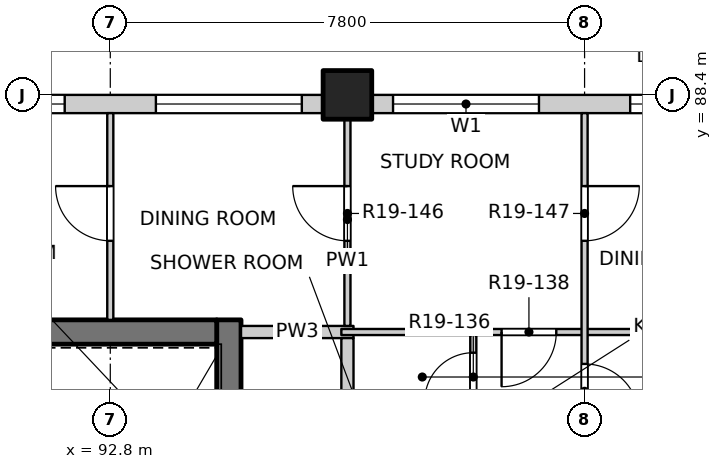
"""IFC4 building model, lengths in metres.
Left out: names, types, materials, properties, quantities, classifications, styles, units other than length and angle.
Written with IfcOpenShell. Run it as: python <this file> out.ifc"""

import sys

from ifc_helpers import new_model, si_unit, direction, frame, frame_2d, origin, origin_2d, place, context, subcontext, project, spatial, rectangle, extrude, element, fill, save


model = new_model("IFC4")
c1 = context("Model", 3, precision=1e-05, world=origin(), true_north=direction((0.0, 1.0)))
c2 = subcontext(c1, "Body", "Model", "MODEL_VIEW")
j1 = project(units=[si_unit("LENGTHUNIT", "METRE"), si_unit("PLANEANGLEUNIT", "RADIAN")], contexts=[c1])
p1 = place(None, origin())
s1 = spatial("IfcSite", under=j1, at=p1, CompositionType="ELEMENT")
p2 = place(p1, origin())
s2 = spatial("IfcBuilding", under=s1, at=p2, CompositionType="ELEMENT")
p3 = place(p2, frame((0.0, 0.0, 197.3)))
s3 = spatial("IfcBuildingStorey", under=s2, at=p3, CompositionType="ELEMENT", Elevation=197.3)
p4 = place(p3, frame((96.7, 88.4, -0.3), z_axis=(0.0, 0.0, 1.0), x_axis=(1.0, 0.0, 0.0)))
e1 = element("IfcColumn", 1, at=p4, inside=s3, PredefinedType="COLUMN", context=c2, shape_type="SweptSolid", body=[
    extrude(rectangle(XDim=0.8, YDim=0.8, at=origin_2d()), origin(), (0.0, 0.0, 1.0), 3.45),
])
p5 = place(p3, frame((94.75, 77.3, -0.3), z_axis=(0.0, 0.0, 1.0), x_axis=(0.0, 1.0, 0.0)))
e2 = element("IfcWall", 2, at=p5, inside=s3, PredefinedType="SOLIDWALL", context=c2, shape_type="SweptSolid", body=[
    extrude(rectangle(XDim=7.4, YDim=0.4, at=frame_2d((3.7, 0.0))), origin(), (0.0, 0.0, 1.0), 3.45),
])
p6 = place(p5, frame((0.3, 0.0, 0.3)))
e3 = element("IfcOpeningElement", 3, at=p6, cuts=e2, PredefinedType="OPENING", context=c2, shape_type="SweptSolid", body=[
    extrude(rectangle(XDim=1.2, YDim=2.1, at=frame_2d((0.6, 1.05))), frame((0.0, 0.21, 0.0), z_axis=(0.0, -1.0, 0.0), x_axis=(1.0, 0.0, 0.0)), (0.0, 0.0, 1.0), 0.42),
])
p7 = place(p3, frame((75.45, 84.5, -0.3), z_axis=(0.0, 0.0, 1.0), x_axis=(1.0, 0.0, 0.0)))
e4 = element("IfcWall", 4, at=p7, inside=s3, PredefinedType="SOLIDWALL", context=c2, shape_type="SweptSolid", body=[
    extrude(rectangle(XDim=19.1, YDim=0.4, at=frame_2d((9.55, 0.0))), origin(), (0.0, 0.0, 1.0), 3.45),
])
p8 = place(p3, frame((73.7, 88.25, 0.0), z_axis=(0.0, 0.0, 1.0), x_axis=(1.0, 0.0, 0.0)))
e5 = element("IfcWall", 5, at=p8, inside=s3, PredefinedType="SOLIDWALL", context=c2, shape_type="SweptSolid", body=[
    extrude(rectangle(XDim=22.6, YDim=0.3, at=frame_2d((11.3, 0.0))), origin(), (0.0, 0.0, 1.0), 2.7),
])
p9 = place(p8, frame((0.35, 0.0, 0.9)))
e6 = element("IfcOpeningElement", 6, at=p9, cuts=e5, PredefinedType="OPENING", context=c2, shape_type="SweptSolid", body=[
    extrude(rectangle(XDim=2.4, YDim=1.8, at=frame_2d((1.2, 0.9))), frame((0.0, 0.16, 0.0), z_axis=(0.0, -1.0, 0.0), x_axis=(1.0, 0.0, 0.0)), (0.0, 0.0, 1.0), 0.32),
])
p10 = place(p8, frame((4.25, 0.0, 0.9)))
e7 = element("IfcOpeningElement", 7, at=p10, cuts=e5, PredefinedType="OPENING", context=c2, shape_type="SweptSolid", body=[
    extrude(rectangle(XDim=2.4, YDim=1.8, at=frame_2d((1.2, 0.9))), frame((0.0, 0.16, 0.0), z_axis=(0.0, -1.0, 0.0), x_axis=(1.0, 0.0, 0.0)), (0.0, 0.0, 1.0), 0.32),
])
p11 = place(p8, frame((8.15, 0.0, 0.9)))
e8 = element("IfcOpeningElement", 8, at=p11, cuts=e5, PredefinedType="OPENING", context=c2, shape_type="SweptSolid", body=[
    extrude(rectangle(XDim=2.4, YDim=1.8, at=frame_2d((1.2, 0.9))), frame((0.0, 0.16, 0.0), z_axis=(0.0, -1.0, 0.0), x_axis=(1.0, 0.0, 0.0)), (0.0, 0.0, 1.0), 0.32),
])
p12 = place(p8, frame((12.05, 0.0, 0.9)))
e9 = element("IfcOpeningElement", 9, at=p12, cuts=e5, PredefinedType="OPENING", context=c2, shape_type="SweptSolid", body=[
    extrude(rectangle(XDim=2.4, YDim=1.8, at=frame_2d((1.2, 0.9))), frame((0.0, 0.16, 0.0), z_axis=(0.0, -1.0, 0.0), x_axis=(1.0, 0.0, 0.0)), (0.0, 0.0, 1.0), 0.32),
])
p13 = place(p8, frame((15.95, 0.0, 0.9)))
e10 = element("IfcOpeningElement", 10, at=p13, cuts=e5, PredefinedType="OPENING", context=c2, shape_type="SweptSolid", body=[
    extrude(rectangle(XDim=2.4, YDim=1.8, at=frame_2d((1.2, 0.9))), frame((0.0, 0.16, 0.0), z_axis=(0.0, -1.0, 0.0), x_axis=(1.0, 0.0, 0.0)), (0.0, 0.0, 1.0), 0.32),
])
p14 = place(p8, frame((19.85, 0.0, 0.9)))
e11 = element("IfcOpeningElement", 11, at=p14, cuts=e5, PredefinedType="OPENING", context=c2, shape_type="SweptSolid", body=[
    extrude(rectangle(XDim=2.4, YDim=1.8, at=frame_2d((1.2, 0.9))), frame((0.0, 0.16, 0.0), z_axis=(0.0, -1.0, 0.0), x_axis=(1.0, 0.0, 0.0)), (0.0, 0.0, 1.0), 0.32),
])
p15 = place(p3, frame((97.1, 88.25, 0.0), z_axis=(0.0, 0.0, 1.0), x_axis=(1.0, 0.0, 0.0)))
e12 = element("IfcWall", 12, at=p15, inside=s3, PredefinedType="SOLIDWALL", context=c2, shape_type="SweptSolid", body=[
    extrude(rectangle(XDim=7.4, YDim=0.3, at=frame_2d((3.7, 0.0))), origin(), (0.0, 0.0, 1.0), 2.7),
])
p16 = place(p15, frame((0.35, 0.0, 0.9)))
e13 = element("IfcOpeningElement", 13, at=p16, cuts=e12, PredefinedType="OPENING", context=c2, shape_type="SweptSolid", body=[
    extrude(rectangle(XDim=2.4, YDim=1.8, at=frame_2d((1.2, 0.9))), frame((0.0, 0.16, 0.0), z_axis=(0.0, -1.0, 0.0), x_axis=(1.0, 0.0, 0.0)), (0.0, 0.0, 1.0), 0.32),
])
p17 = place(p15, frame((4.25, 0.0, 0.9)))
e14 = element("IfcOpeningElement", 14, at=p17, cuts=e12, PredefinedType="OPENING", context=c2, shape_type="SweptSolid", body=[
    extrude(rectangle(XDim=2.4, YDim=1.8, at=frame_2d((1.2, 0.9))), frame((0.0, 0.16, 0.0), z_axis=(0.0, -1.0, 0.0), x_axis=(1.0, 0.0, 0.0)), (0.0, 0.0, 1.0), 0.32),
])
p18 = place(p3, frame((94.95, 84.5, 0.0), z_axis=(0.0, 0.0, 1.0), x_axis=(1.0, 0.0, 0.0)))
e15 = element("IfcWall", 15, at=p18, inside=s3, PredefinedType="PARTITIONING", context=c2, shape_type="SweptSolid", body=[
    extrude(rectangle(XDim=1.85, YDim=0.2, at=frame_2d((0.925, 0.0))), origin(), (0.0, 0.0, 1.0), 3.15),
])
p19 = place(p3, frame((96.6, 84.5, 0.0), z_axis=(0.0, 0.0, 1.0), x_axis=(1.0, 0.0, 0.0)))
e16 = element("IfcWall", 16, at=p19, inside=s3, PredefinedType="PARTITIONING", context=c2, shape_type="SweptSolid", body=[
    extrude(rectangle(XDim=11.5, YDim=0.1, at=frame_2d((5.75, 0.0))), origin(), (0.0, 0.0, 1.0), 3.15),
])
p20 = place(p19, frame((2.635, 0.0, 0.0)))
e17 = element("IfcOpeningElement", 17, at=p20, cuts=e16, PredefinedType="OPENING", context=c2, shape_type="SweptSolid", body=[
    extrude(rectangle(XDim=0.9, YDim=2.1, at=frame_2d((0.45, 1.05))), frame((0.0, 0.06, 0.0), z_axis=(0.0, -1.0, 0.0), x_axis=(1.0, 0.0, 0.0)), (0.0, 0.0, 1.0), 0.12),
])
p21 = place(p3, frame((92.8, 84.7, 0.0), z_axis=(0.0, 0.0, 1.0), x_axis=(0.0, 1.0, 0.0)))
e18 = element("IfcWall", 18, at=p21, inside=s3, PredefinedType="PARTITIONING", context=c2, shape_type="SweptSolid", body=[
    extrude(rectangle(XDim=3.4, YDim=0.1, at=frame_2d((1.7, 0.0))), origin(), (0.0, 0.0, 1.0), 3.15),
])
p22 = place(p21, frame((1.3, 0.0, 0.0)))
e19 = element("IfcOpeningElement", 19, at=p22, cuts=e18, PredefinedType="OPENING", context=c2, shape_type="SweptSolid", body=[
    extrude(rectangle(XDim=0.9, YDim=2.1, at=frame_2d((0.45, 1.05))), frame((0.0, 0.06, 0.0), z_axis=(0.0, -1.0, 0.0), x_axis=(1.0, 0.0, 0.0)), (0.0, 0.0, 1.0), 0.12),
])
p23 = place(p3, frame((96.7, 49.5, 0.0), z_axis=(0.0, 0.0, 1.0), x_axis=(0.0, 1.0, 0.0)))
e20 = element("IfcWall", 20, at=p23, inside=s3, PredefinedType="PARTITIONING", context=c2, shape_type="SweptSolid", body=[
    extrude(rectangle(XDim=34.9, YDim=0.2, at=frame_2d((17.45, 0.0))), origin(), (0.0, 0.0, 1.0), 3.15),
])
p24 = place(p23, frame((6.525, 0.0, 0.0)))
e21 = element("IfcOpeningElement", 21, at=p24, cuts=e20, PredefinedType="OPENING", context=c2, shape_type="SweptSolid", body=[
    extrude(rectangle(XDim=1.0, YDim=2.1, at=frame_2d((0.5, 1.05))), frame((0.0, 0.11, 0.0), z_axis=(0.0, -1.0, 0.0), x_axis=(1.0, 0.0, 0.0)), (0.0, 0.0, 1.0), 0.22),
])
p25 = place(p23, frame((14.275, 0.0, 0.0)))
e22 = element("IfcOpeningElement", 22, at=p25, cuts=e20, PredefinedType="OPENING", context=c2, shape_type="SweptSolid", body=[
    extrude(rectangle(XDim=1.0, YDim=2.1, at=frame_2d((0.5, 1.05))), frame((0.0, 0.11, 0.0), z_axis=(0.0, -1.0, 0.0), x_axis=(1.0, 0.0, 0.0)), (0.0, 0.0, 1.0), 0.22),
])
p26 = place(p23, frame((25.075, 0.0, 0.0)))
e23 = element("IfcOpeningElement", 23, at=p26, cuts=e20, PredefinedType="OPENING", context=c2, shape_type="SweptSolid", body=[
    extrude(rectangle(XDim=1.0, YDim=2.1, at=frame_2d((0.5, 1.05))), frame((0.0, 0.11, 0.0), z_axis=(0.0, -1.0, 0.0), x_axis=(1.0, 0.0, 0.0)), (0.0, 0.0, 1.0), 0.22),
])
p27 = place(p23, frame((30.475, 0.0, 0.0)))
e24 = element("IfcOpeningElement", 24, at=p27, cuts=e20, PredefinedType="OPENING", context=c2, shape_type="SweptSolid", body=[
    extrude(rectangle(XDim=1.0, YDim=2.1, at=frame_2d((0.5, 1.05))), frame((0.0, 0.11, 0.0), z_axis=(0.0, -1.0, 0.0), x_axis=(1.0, 0.0, 0.0)), (0.0, 0.0, 1.0), 0.22),
])
p28 = place(p3, frame((96.7, 84.6, 0.0), z_axis=(0.0, 0.0, 1.0), x_axis=(0.0, 1.0, 0.0)))
e25 = element("IfcWall", 25, at=p28, inside=s3, PredefinedType="PARTITIONING", context=c2, shape_type="SweptSolid", body=[
    extrude(rectangle(XDim=3.5, YDim=0.1, at=frame_2d((1.75, 0.0))), origin(), (0.0, 0.0, 1.0), 3.15),
])
p29 = place(p28, frame((1.4, 0.0, 0.0)))
e26 = element("IfcOpeningElement", 26, at=p29, cuts=e25, PredefinedType="OPENING", context=c2, shape_type="SweptSolid", body=[
    extrude(rectangle(XDim=0.9, YDim=2.1, at=frame_2d((0.45, 1.05))), frame((0.0, 0.06, 0.0), z_axis=(0.0, -1.0, 0.0), x_axis=(1.0, 0.0, 0.0)), (0.0, 0.0, 1.0), 0.12),
])
p30 = place(p3, frame((98.77, 79.85, 0.0), z_axis=(0.0, 0.0, 1.0), x_axis=(0.0, 1.0, 0.0)))
e27 = element("IfcWall", 27, at=p30, inside=s3, PredefinedType="PARTITIONING", context=c2, shape_type="SweptSolid", body=[
    extrude(rectangle(XDim=4.6, YDim=0.1, at=frame_2d((2.3, 0.0))), origin(), (0.0, 0.0, 1.0), 3.15),
])
p31 = place(p30, frame((0.175, 0.0, 0.0)))
e28 = element("IfcOpeningElement", 28, at=p31, cuts=e27, PredefinedType="OPENING", context=c2, shape_type="SweptSolid", body=[
    extrude(rectangle(XDim=0.9, YDim=2.1, at=frame_2d((0.45, 1.05))), frame((0.0, 0.06, 0.0), z_axis=(0.0, -1.0, 0.0), x_axis=(1.0, 0.0, 0.0)), (0.0, 0.0, 1.0), 0.12),
])
p32 = place(p30, frame((1.785, 0.0, 0.0)))
e29 = element("IfcOpeningElement", 29, at=p32, cuts=e27, PredefinedType="OPENING", context=c2, shape_type="SweptSolid", body=[
    extrude(rectangle(XDim=0.9, YDim=2.1, at=frame_2d((0.45, 1.05))), frame((0.0, 0.06, 0.0), z_axis=(0.0, -1.0, 0.0), x_axis=(1.0, 0.0, 0.0)), (0.0, 0.0, 1.0), 0.12),
])
p33 = place(p30, frame((3.51, 0.0, 0.0)))
e30 = element("IfcOpeningElement", 30, at=p33, cuts=e27, PredefinedType="OPENING", context=c2, shape_type="SweptSolid", body=[
    extrude(rectangle(XDim=0.8, YDim=2.1, at=frame_2d((0.4, 1.05))), frame((0.0, 0.06, 0.0), z_axis=(0.0, -1.0, 0.0), x_axis=(1.0, 0.0, 0.0)), (0.0, 0.0, 1.0), 0.12),
])
p34 = place(p3, frame((100.6, 41.9, 0.0), z_axis=(0.0, 0.0, 1.0), x_axis=(0.0, 1.0, 0.0)))
e31 = element("IfcWall", 31, at=p34, inside=s3, PredefinedType="PARTITIONING", context=c2, shape_type="SweptSolid", body=[
    extrude(rectangle(XDim=46.2, YDim=0.1, at=frame_2d((23.1, 0.0))), origin(), (0.0, 0.0, 1.0), 3.15),
])
p35 = place(p34, frame((1.2, 0.0, 0.0)))
e32 = element("IfcOpeningElement", 32, at=p35, cuts=e31, PredefinedType="OPENING", context=c2, shape_type="SweptSolid", body=[
    extrude(rectangle(XDim=0.9, YDim=2.1, at=frame_2d((0.45, 1.05))), frame((0.0, 0.06, 0.0), z_axis=(0.0, -1.0, 0.0), x_axis=(1.0, 0.0, 0.0)), (0.0, 0.0, 1.0), 0.12),
])
p36 = place(p34, frame((5.1, 0.0, 0.0)))
e33 = element("IfcOpeningElement", 33, at=p36, cuts=e31, PredefinedType="OPENING", context=c2, shape_type="SweptSolid", body=[
    extrude(rectangle(XDim=0.9, YDim=2.1, at=frame_2d((0.45, 1.05))), frame((0.0, 0.06, 0.0), z_axis=(0.0, -1.0, 0.0), x_axis=(1.0, 0.0, 0.0)), (0.0, 0.0, 1.0), 0.12),
])
p37 = place(p34, frame((9.975, 0.0, 0.0)))
e34 = element("IfcOpeningElement", 34, at=p37, cuts=e31, PredefinedType="OPENING", context=c2, shape_type="SweptSolid", body=[
    extrude(rectangle(XDim=0.9, YDim=2.1, at=frame_2d((0.45, 1.05))), frame((0.0, 0.06, 0.0), z_axis=(0.0, -1.0, 0.0), x_axis=(1.0, 0.0, 0.0)), (0.0, 0.0, 1.0), 0.12),
])
p38 = place(p34, frame((12.9, 0.0, 0.0)))
e35 = element("IfcOpeningElement", 35, at=p38, cuts=e31, PredefinedType="OPENING", context=c2, shape_type="SweptSolid", body=[
    extrude(rectangle(XDim=0.9, YDim=2.1, at=frame_2d((0.45, 1.05))), frame((0.0, 0.06, 0.0), z_axis=(0.0, -1.0, 0.0), x_axis=(1.0, 0.0, 0.0)), (0.0, 0.0, 1.0), 0.12),
])
p39 = place(p34, frame((17.775, 0.0, 0.0)))
e36 = element("IfcOpeningElement", 36, at=p39, cuts=e31, PredefinedType="OPENING", context=c2, shape_type="SweptSolid", body=[
    extrude(rectangle(XDim=0.9, YDim=2.1, at=frame_2d((0.45, 1.05))), frame((0.0, 0.06, 0.0), z_axis=(0.0, -1.0, 0.0), x_axis=(1.0, 0.0, 0.0)), (0.0, 0.0, 1.0), 0.12),
])
p40 = place(p34, frame((20.7, 0.0, 0.0)))
e37 = element("IfcOpeningElement", 37, at=p40, cuts=e31, PredefinedType="OPENING", context=c2, shape_type="SweptSolid", body=[
    extrude(rectangle(XDim=0.9, YDim=2.1, at=frame_2d((0.45, 1.05))), frame((0.0, 0.06, 0.0), z_axis=(0.0, -1.0, 0.0), x_axis=(1.0, 0.0, 0.0)), (0.0, 0.0, 1.0), 0.12),
])
p41 = place(p34, frame((25.575, 0.0, 0.0)))
e38 = element("IfcOpeningElement", 38, at=p41, cuts=e31, PredefinedType="OPENING", context=c2, shape_type="SweptSolid", body=[
    extrude(rectangle(XDim=0.9, YDim=2.1, at=frame_2d((0.45, 1.05))), frame((0.0, 0.06, 0.0), z_axis=(0.0, -1.0, 0.0), x_axis=(1.0, 0.0, 0.0)), (0.0, 0.0, 1.0), 0.12),
])
p42 = place(p34, frame((28.5, 0.0, 0.0)))
e39 = element("IfcOpeningElement", 39, at=p42, cuts=e31, PredefinedType="OPENING", context=c2, shape_type="SweptSolid", body=[
    extrude(rectangle(XDim=0.9, YDim=2.1, at=frame_2d((0.45, 1.05))), frame((0.0, 0.06, 0.0), z_axis=(0.0, -1.0, 0.0), x_axis=(1.0, 0.0, 0.0)), (0.0, 0.0, 1.0), 0.12),
])
p43 = place(p34, frame((33.375, 0.0, 0.0)))
e40 = element("IfcOpeningElement", 40, at=p43, cuts=e31, PredefinedType="OPENING", context=c2, shape_type="SweptSolid", body=[
    extrude(rectangle(XDim=0.9, YDim=2.1, at=frame_2d((0.45, 1.05))), frame((0.0, 0.06, 0.0), z_axis=(0.0, -1.0, 0.0), x_axis=(1.0, 0.0, 0.0)), (0.0, 0.0, 1.0), 0.12),
])
p44 = place(p34, frame((37.225, 0.0, 0.0)))
e41 = element("IfcOpeningElement", 41, at=p44, cuts=e31, PredefinedType="OPENING", context=c2, shape_type="SweptSolid", body=[
    extrude(rectangle(XDim=0.9, YDim=2.1, at=frame_2d((0.45, 1.05))), frame((0.0, 0.06, 0.0), z_axis=(0.0, -1.0, 0.0), x_axis=(1.0, 0.0, 0.0)), (0.0, 0.0, 1.0), 0.12),
])
p45 = place(p34, frame((41.175, 0.0, 0.0)))
e42 = element("IfcOpeningElement", 42, at=p45, cuts=e31, PredefinedType="OPENING", context=c2, shape_type="SweptSolid", body=[
    extrude(rectangle(XDim=0.9, YDim=2.1, at=frame_2d((0.45, 1.05))), frame((0.0, 0.06, 0.0), z_axis=(0.0, -1.0, 0.0), x_axis=(1.0, 0.0, 0.0)), (0.0, 0.0, 1.0), 0.12),
])
p46 = place(p34, frame((44.1, 0.0, 0.0)))
e43 = element("IfcOpeningElement", 43, at=p46, cuts=e31, PredefinedType="OPENING", context=c2, shape_type="SweptSolid", body=[
    extrude(rectangle(XDim=0.9, YDim=2.1, at=frame_2d((0.45, 1.05))), frame((0.0, 0.06, 0.0), z_axis=(0.0, -1.0, 0.0), x_axis=(1.0, 0.0, 0.0)), (0.0, 0.0, 1.0), 0.12),
])
p47 = place(p13, origin())
e44 = element("IfcWindow", 44, at=p47, inside=s3, PartitioningType="DOUBLE_PANEL_VERTICAL", PredefinedType="WINDOW", context=c2, shape_type="SweptSolid", body=[
    extrude(rectangle(XDim=2.4, YDim=1.8, at=frame_2d((1.2, 0.9))), frame((0.0, 0.03, 0.0), z_axis=(0.0, -1.0, 0.0), x_axis=(1.0, 0.0, 0.0)), (0.0, 0.0, 1.0), 0.06),
])
fill(e10, e44)
p48 = place(p14, origin())
e45 = element("IfcWindow", 45, at=p48, inside=s3, PartitioningType="DOUBLE_PANEL_VERTICAL", PredefinedType="WINDOW", context=c2, shape_type="SweptSolid", body=[
    extrude(rectangle(XDim=2.4, YDim=1.8, at=frame_2d((1.2, 0.9))), frame((0.0, 0.03, 0.0), z_axis=(0.0, -1.0, 0.0), x_axis=(1.0, 0.0, 0.0)), (0.0, 0.0, 1.0), 0.06),
])
fill(e11, e45)
p49 = place(p16, origin())
e46 = element("IfcWindow", 46, at=p49, inside=s3, PartitioningType="DOUBLE_PANEL_VERTICAL", PredefinedType="WINDOW", context=c2, shape_type="SweptSolid", body=[
    extrude(rectangle(XDim=2.4, YDim=1.8, at=frame_2d((1.2, 0.9))), frame((0.0, 0.03, 0.0), z_axis=(0.0, -1.0, 0.0), x_axis=(1.0, 0.0, 0.0)), (0.0, 0.0, 1.0), 0.06),
])
fill(e13, e46)
p50 = place(p17, origin())
e47 = element("IfcWindow", 47, at=p50, inside=s3, PartitioningType="DOUBLE_PANEL_VERTICAL", PredefinedType="WINDOW", context=c2, shape_type="SweptSolid", body=[
    extrude(rectangle(XDim=2.4, YDim=1.8, at=frame_2d((1.2, 0.9))), frame((0.0, 0.03, 0.0), z_axis=(0.0, -1.0, 0.0), x_axis=(1.0, 0.0, 0.0)), (0.0, 0.0, 1.0), 0.06),
])
fill(e14, e47)
p51 = place(p45, origin())
e48 = element("IfcDoor", 48, at=p51, inside=s3, OperationType="SINGLE_SWING_RIGHT", PredefinedType="DOOR", context=c2, shape_type="SweptSolid", body=[
    extrude(rectangle(XDim=0.9, YDim=2.1, at=frame_2d((0.45, 1.05))), frame((0.0, 0.025, 0.0), z_axis=(0.0, -1.0, 0.0), x_axis=(1.0, 0.0, 0.0)), (0.0, 0.0, 1.0), 0.05),
])
fill(e42, e48)
p52 = place(p33, origin())
e49 = element("IfcDoor", 49, at=p52, inside=s3, OperationType="SINGLE_SWING_LEFT", PredefinedType="DOOR", context=c2, shape_type="SweptSolid", body=[
    extrude(rectangle(XDim=0.8, YDim=2.1, at=frame_2d((0.4, 1.05))), frame((0.0, 0.025, 0.0), z_axis=(0.0, -1.0, 0.0), x_axis=(1.0, 0.0, 0.0)), (0.0, 0.0, 1.0), 0.05),
])
fill(e30, e49)
p53 = place(p20, origin())
e50 = element("IfcDoor", 50, at=p53, inside=s3, OperationType="SINGLE_SWING_RIGHT", PredefinedType="DOOR", context=c2, shape_type="SweptSolid", body=[
    extrude(rectangle(XDim=0.9, YDim=2.1, at=frame_2d((0.45, 1.05))), frame((0.0, 0.025, 0.0), z_axis=(0.0, -1.0, 0.0), x_axis=(1.0, 0.0, 0.0)), (0.0, 0.0, 1.0), 0.05),
])
fill(e17, e50)
p54 = place(p22, origin())
e51 = element("IfcDoor", 51, at=p54, inside=s3, OperationType="SINGLE_SWING_RIGHT", PredefinedType="DOOR", context=c2, shape_type="SweptSolid", body=[
    extrude(rectangle(XDim=0.9, YDim=2.1, at=frame_2d((0.45, 1.05))), frame((0.0, 0.025, 0.0), z_axis=(0.0, -1.0, 0.0), x_axis=(1.0, 0.0, 0.0)), (0.0, 0.0, 1.0), 0.05),
])
fill(e19, e51)
p55 = place(p29, origin())
e52 = element("IfcDoor", 52, at=p55, inside=s3, OperationType="SINGLE_SWING_RIGHT", PredefinedType="DOOR", context=c2, shape_type="SweptSolid", body=[
    extrude(rectangle(XDim=0.9, YDim=2.1, at=frame_2d((0.45, 1.05))), frame((0.0, 0.025, 0.0), z_axis=(0.0, -1.0, 0.0), x_axis=(1.0, 0.0, 0.0)), (0.0, 0.0, 1.0), 0.05),
])
fill(e26, e52)
p56 = place(p46, origin())
e53 = element("IfcDoor", 53, at=p56, inside=s3, OperationType="SINGLE_SWING_LEFT", PredefinedType="DOOR", context=c2, shape_type="SweptSolid", body=[
    extrude(rectangle(XDim=0.9, YDim=2.1, at=frame_2d((0.45, 1.05))), frame((0.0, 0.025, 0.0), z_axis=(0.0, -1.0, 0.0), x_axis=(1.0, 0.0, 0.0)), (0.0, 0.0, 1.0), 0.05),
])
fill(e43, e53)
save(model, sys.argv[1])
